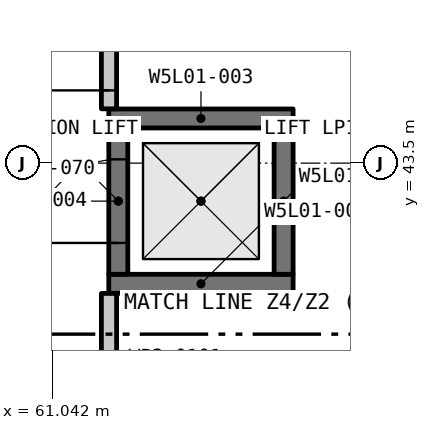
"""IFC4 building model, lengths in metres.
Left out: names, types, materials, properties, quantities, classifications, styles, units other than length and angle.
Written with IfcOpenShell. Run it as: python <this file> out.ifc"""

import sys

from ifc_helpers import new_model, si_unit, direction, frame, frame_2d, origin, place, context, subcontext, project, spatial, rectangle, extrude, element, fill, save


model = new_model("IFC4")
c1 = context("Model", 3, precision=1e-05, world=origin(), true_north=direction((0.0, 1.0)))
c2 = subcontext(c1, "Body", "Model", "MODEL_VIEW")
j1 = project(units=[si_unit("LENGTHUNIT", "METRE"), si_unit("PLANEANGLEUNIT", "RADIAN")], contexts=[c1])
p1 = place(None, origin())
s1 = spatial("IfcSite", under=j1, at=p1, CompositionType="ELEMENT")
p2 = place(p1, origin())
s2 = spatial("IfcBuilding", under=s1, at=p2, CompositionType="ELEMENT")
p3 = place(p2, frame((0.0, 0.0, 6.0)))
s3 = spatial("IfcBuildingStorey", under=s2, at=p3, CompositionType="ELEMENT", Elevation=6.0)
p4 = place(p3, frame((61.788, 41.913, -0.3), z_axis=(0.0, 0.0, 1.0), x_axis=(1.0, 0.0, 0.0)))
e1 = element("IfcWall", 1, at=p4, inside=s3, PredefinedType="SHEAR", context=c2, shape_type="SweptSolid", body=[
    extrude(rectangle(XDim=2.425, YDim=0.25, at=frame_2d((1.212, 0.0))), origin(), (0.0, 0.0, 1.0), 5.25),
])
p5 = place(p3, frame((64.087, 42.038, -0.3), z_axis=(0.0, 0.0, 1.0), x_axis=(0.0, 1.0, 0.0)))
e2 = element("IfcWall", 2, at=p5, inside=s3, PredefinedType="SHEAR", context=c2, shape_type="SweptSolid", body=[
    extrude(rectangle(XDim=1.925, YDim=0.25, at=frame_2d((0.962, 0.0))), origin(), (0.0, 0.0, 1.0), 5.25),
])
p6 = place(p3, frame((61.788, 44.087, -0.3), z_axis=(0.0, 0.0, 1.0), x_axis=(1.0, 0.0, 0.0)))
e3 = element("IfcWall", 3, at=p6, inside=s3, PredefinedType="SHEAR", context=c2, shape_type="SweptSolid", body=[
    extrude(rectangle(XDim=2.425, YDim=0.25, at=frame_2d((1.212, 0.0))), origin(), (0.0, 0.0, 1.0), 5.25),
])
p7 = place(p3, frame((61.913, 42.038, -0.3), z_axis=(0.0, 0.0, 1.0), x_axis=(0.0, 1.0, 0.0)))
e4 = element("IfcWall", 4, at=p7, inside=s3, PredefinedType="SHEAR", context=c2, shape_type="SweptSolid", body=[
    extrude(rectangle(XDim=1.925, YDim=0.25, at=frame_2d((0.962, 0.0))), origin(), (0.0, 0.0, 1.0), 5.25),
])
p8 = place(p7, frame((0.413, 0.0, 0.3)))
e5 = element("IfcOpeningElement", 5, at=p8, cuts=e4, PredefinedType="OPENING", context=c2, shape_type="SweptSolid", body=[
    extrude(rectangle(XDim=1.1, YDim=2.1, at=frame_2d((0.55, 1.05))), frame((0.0, 0.135, 0.0), z_axis=(0.0, -1.0, 0.0), x_axis=(1.0, 0.0, 0.0)), (0.0, 0.0, 1.0), 0.27),
])
p9 = place(p3, frame((61.79, 40.1, 0.0), z_axis=(0.0, 0.0, 1.0), x_axis=(0.0, 1.0, 0.0)))
e6 = element("IfcWall", 6, at=p9, inside=s3, PredefinedType="PARTITIONING", context=c2, shape_type="SweptSolid", body=[
    extrude(rectangle(XDim=1.685, YDim=0.2, at=frame_2d((0.843, 0.0))), origin(), (0.0, 0.0, 1.0), 4.95),
])
p10 = place(p3, frame((61.79, 44.215, 0.0), z_axis=(0.0, 0.0, 1.0), x_axis=(0.0, 1.0, 0.0)))
e7 = element("IfcWall", 7, at=p10, inside=s3, PredefinedType="PARTITIONING", context=c2, shape_type="SweptSolid", body=[
    extrude(rectangle(XDim=1.885, YDim=0.2, at=frame_2d((0.943, 0.0))), origin(), (0.0, 0.0, 1.0), 4.95),
])
p11 = place(p10, frame((0.242, 0.0, 0.0)))
e8 = element("IfcOpeningElement", 8, at=p11, cuts=e7, PredefinedType="OPENING", context=c2, shape_type="SweptSolid", body=[
    extrude(rectangle(XDim=1.5, YDim=2.1, at=frame_2d((0.75, 1.05))), frame((0.0, 0.11, 0.0), z_axis=(0.0, -1.0, 0.0), x_axis=(1.0, 0.0, 0.0)), (0.0, 0.0, 1.0), 0.22),
])
p12 = place(p8, origin())
e9 = element("IfcDoor", 9, at=p12, inside=s3, OperationType="DOUBLE_DOOR_SLIDING", PredefinedType="DOOR", context=c2, shape_type="SweptSolid", body=[
    extrude(rectangle(XDim=1.1, YDim=2.1, at=frame_2d((0.55, 1.05))), frame((0.0, 0.025, 0.0), z_axis=(0.0, -1.0, 0.0), x_axis=(1.0, 0.0, 0.0)), (0.0, 0.0, 1.0), 0.05),
])
fill(e5, e9)
p13 = place(p11, origin())
e10 = element("IfcDoor", 10, at=p13, inside=s3, OperationType="DOUBLE_DOOR_SINGLE_SWING", PredefinedType="DOOR", context=c2, shape_type="SweptSolid", body=[
    extrude(rectangle(XDim=1.5, YDim=2.1, at=frame_2d((0.75, 1.05))), frame((0.0, 0.025, 0.0), z_axis=(0.0, -1.0, 0.0), x_axis=(1.0, 0.0, 0.0)), (0.0, 0.0, 1.0), 0.05),
])
fill(e8, e10)
save(model, sys.argv[1])
